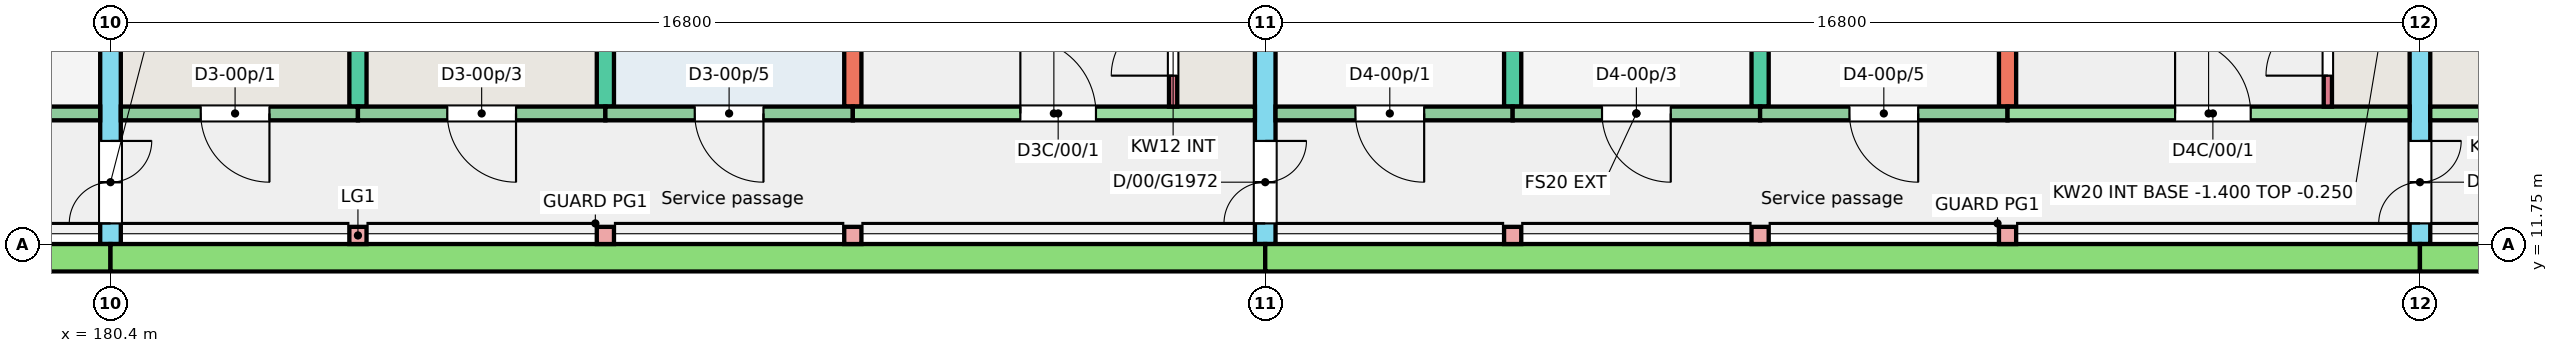
"""IFC4 building model, lengths in metres.
Left out: names, types, materials, properties, quantities, classifications, styles, units other than length and angle.
Written with IfcOpenShell. Run it as: python <this file> out.ifc"""

import sys

from ifc_helpers import new_model, si_unit, direction, frame, frame_2d, origin, origin_2d, place, context, subcontext, project, spatial, rectangle, extrude, element, fill, save


model = new_model("IFC4")
c1 = context("Model", 3, precision=1e-05, world=origin(), true_north=direction((0.0, 1.0)))
c2 = subcontext(c1, "Body", "Model", "MODEL_VIEW")
j1 = project(units=[si_unit("LENGTHUNIT", "METRE"), si_unit("PLANEANGLEUNIT", "RADIAN")], contexts=[c1])
p1 = place(None, origin())
s1 = spatial("IfcSite", under=j1, at=p1, CompositionType="ELEMENT")
p2 = place(p1, origin())
s2 = spatial("IfcBuilding", under=s1, at=p2, CompositionType="ELEMENT")
p3 = place(p2, origin())
s3 = spatial("IfcBuildingStorey", under=s2, at=p3, CompositionType="ELEMENT", Elevation=0.0)
p4 = place(p3, frame((180.4, 11.75, -0.25), z_axis=(0.0, 0.0, 1.0), x_axis=(0.0, 1.0, 0.0)))
e1 = element("IfcWall", 1, at=p4, inside=s3, PredefinedType="SHEAR", context=c2, shape_type="SweptSolid", body=[
    extrude(rectangle(XDim=11.0, YDim=0.3, at=frame_2d((5.5, 0.0))), origin(), (0.0, 0.0, 1.0), 3.25),
])
p5 = place(p4, frame((0.3, 0.0, 0.25)))
e2 = element("IfcOpeningElement", 2, at=p5, cuts=e1, PredefinedType="OPENING", context=c2, shape_type="SweptSolid", body=[
    extrude(rectangle(XDim=1.2, YDim=2.1, at=frame_2d((0.6, 1.05))), frame((0.0, 0.16, 0.0), z_axis=(0.0, -1.0, 0.0), x_axis=(1.0, 0.0, 0.0)), (0.0, 0.0, 1.0), 0.32),
])
for number, where, z_axis, x_axis in (
    (3, (184.0, 13.75, -0.25), (0.0, 0.0, 1.0), (0.0, 1.0, 0.0)),
    (4, (187.6, 13.75, -0.25), (0.0, 0.0, 1.0), (0.0, 1.0, 0.0)),
    (5, (191.2, 13.75, -0.25), (0.0, 0.0, 1.0), (0.0, 1.0, 0.0)),
):
    element("IfcWall", number, at=place(p3, frame(where, z_axis=z_axis, x_axis=x_axis)), inside=s3, PredefinedType="SHEAR", context=c2, shape_type="SweptSolid", body=[
        extrude(rectangle(XDim=9.0, YDim=0.25, at=frame_2d((4.5, 0.0))), origin(), (0.0, 0.0, 1.0), 3.25),
    ])
p6 = place(p3, frame((197.2, 11.75, -0.25), z_axis=(0.0, 0.0, 1.0), x_axis=(0.0, 1.0, 0.0)))
e6 = element("IfcWall", 6, at=p6, inside=s3, PredefinedType="SHEAR", context=c2, shape_type="SweptSolid", body=[
    extrude(rectangle(XDim=11.0, YDim=0.3, at=frame_2d((5.5, 0.0))), origin(), (0.0, 0.0, 1.0), 3.25),
])
p7 = place(p6, frame((0.3, 0.0, 0.25)))
e7 = element("IfcOpeningElement", 7, at=p7, cuts=e6, PredefinedType="OPENING", context=c2, shape_type="SweptSolid", body=[
    extrude(rectangle(XDim=1.2, YDim=2.1, at=frame_2d((0.6, 1.05))), frame((0.0, 0.16, 0.0), z_axis=(0.0, -1.0, 0.0), x_axis=(1.0, 0.0, 0.0)), (0.0, 0.0, 1.0), 0.32),
])
for number, where, z_axis, x_axis in (
    (8, (200.8, 13.75, -0.25), (0.0, 0.0, 1.0), (0.0, 1.0, 0.0)),
    (9, (204.4, 13.75, -0.25), (0.0, 0.0, 1.0), (0.0, 1.0, 0.0)),
    (10, (208.0, 13.75, -0.25), (0.0, 0.0, 1.0), (0.0, 1.0, 0.0)),
):
    element("IfcWall", number, at=place(p3, frame(where, z_axis=z_axis, x_axis=x_axis)), inside=s3, PredefinedType="SHEAR", context=c2, shape_type="SweptSolid", body=[
        extrude(rectangle(XDim=9.0, YDim=0.25, at=frame_2d((4.5, 0.0))), origin(), (0.0, 0.0, 1.0), 3.25),
    ])
p8 = place(p3, frame((214.0, 11.75, -0.25), z_axis=(0.0, 0.0, 1.0), x_axis=(0.0, 1.0, 0.0)))
e11 = element("IfcWall", 11, at=p8, inside=s3, PredefinedType="SHEAR", context=c2, shape_type="SweptSolid", body=[
    extrude(rectangle(XDim=11.0, YDim=0.3, at=frame_2d((5.5, 0.0))), origin(), (0.0, 0.0, 1.0), 3.25),
])
p9 = place(p8, frame((0.3, 0.0, 0.25)))
e12 = element("IfcOpeningElement", 12, at=p9, cuts=e11, PredefinedType="OPENING", context=c2, shape_type="SweptSolid", body=[
    extrude(rectangle(XDim=1.2, YDim=2.1, at=frame_2d((0.6, 1.05))), frame((0.0, 0.16, 0.0), z_axis=(0.0, -1.0, 0.0), x_axis=(1.0, 0.0, 0.0)), (0.0, 0.0, 1.0), 0.32),
])
p10 = place(p3, frame((176.8, 13.65, -0.25), z_axis=(0.0, 0.0, 1.0), x_axis=(1.0, 0.0, 0.0)))
e13 = element("IfcWall", 13, at=p10, inside=s3, PredefinedType="SOLIDWALL", context=c2, shape_type="SweptSolid", body=[
    extrude(rectangle(XDim=3.45, YDim=0.2, at=frame_2d((1.725, 0.0))), origin(), (0.0, 0.0, 1.0), 3.25),
])
p11 = place(p10, frame((1.288, 0.0, 0.25)))
e14 = element("IfcOpeningElement", 14, at=p11, cuts=e13, PredefinedType="OPENING", context=c2, shape_type="SweptSolid", body=[
    extrude(rectangle(XDim=1.0, YDim=2.1, at=frame_2d((0.5, 1.05))), frame((0.0, 0.11, 0.0), z_axis=(0.0, -1.0, 0.0), x_axis=(1.0, 0.0, 0.0)), (0.0, 0.0, 1.0), 0.22),
])
p12 = place(p3, frame((180.55, 13.65, -0.25), z_axis=(0.0, 0.0, 1.0), x_axis=(1.0, 0.0, 0.0)))
e15 = element("IfcWall", 15, at=p12, inside=s3, PredefinedType="SOLIDWALL", context=c2, shape_type="SweptSolid", body=[
    extrude(rectangle(XDim=3.45, YDim=0.2, at=frame_2d((1.725, 0.0))), origin(), (0.0, 0.0, 1.0), 3.25),
])
p13 = place(p12, frame((1.163, 0.0, 0.25)))
e16 = element("IfcOpeningElement", 16, at=p13, cuts=e15, PredefinedType="OPENING", context=c2, shape_type="SweptSolid", body=[
    extrude(rectangle(XDim=1.0, YDim=2.1, at=frame_2d((0.5, 1.05))), frame((0.0, 0.11, 0.0), z_axis=(0.0, -1.0, 0.0), x_axis=(1.0, 0.0, 0.0)), (0.0, 0.0, 1.0), 0.22),
])
p14 = place(p3, frame((184.0, 13.65, -0.25), z_axis=(0.0, 0.0, 1.0), x_axis=(1.0, 0.0, 0.0)))
e17 = element("IfcWall", 17, at=p14, inside=s3, PredefinedType="SOLIDWALL", context=c2, shape_type="SweptSolid", body=[
    extrude(rectangle(XDim=3.6, YDim=0.2, at=frame_2d((1.8, 0.0))), origin(), (0.0, 0.0, 1.0), 3.25),
])
p15 = place(p14, frame((1.3, 0.0, 0.25)))
e18 = element("IfcOpeningElement", 18, at=p15, cuts=e17, PredefinedType="OPENING", context=c2, shape_type="SweptSolid", body=[
    extrude(rectangle(XDim=1.0, YDim=2.1, at=frame_2d((0.5, 1.05))), frame((0.0, 0.11, 0.0), z_axis=(0.0, -1.0, 0.0), x_axis=(1.0, 0.0, 0.0)), (0.0, 0.0, 1.0), 0.22),
])
p16 = place(p3, frame((187.6, 13.65, -0.25), z_axis=(0.0, 0.0, 1.0), x_axis=(1.0, 0.0, 0.0)))
e19 = element("IfcWall", 19, at=p16, inside=s3, PredefinedType="SOLIDWALL", context=c2, shape_type="SweptSolid", body=[
    extrude(rectangle(XDim=3.6, YDim=0.2, at=frame_2d((1.8, 0.0))), origin(), (0.0, 0.0, 1.0), 3.25),
])
p17 = place(p16, frame((1.3, 0.0, 0.25)))
e20 = element("IfcOpeningElement", 20, at=p17, cuts=e19, PredefinedType="OPENING", context=c2, shape_type="SweptSolid", body=[
    extrude(rectangle(XDim=1.0, YDim=2.1, at=frame_2d((0.5, 1.05))), frame((0.0, 0.11, 0.0), z_axis=(0.0, -1.0, 0.0), x_axis=(1.0, 0.0, 0.0)), (0.0, 0.0, 1.0), 0.22),
])
p18 = place(p3, frame((191.2, 13.65, -0.25), z_axis=(0.0, 0.0, 1.0), x_axis=(1.0, 0.0, 0.0)))
e21 = element("IfcWall", 21, at=p18, inside=s3, PredefinedType="SHEAR", context=c2, shape_type="SweptSolid", body=[
    extrude(rectangle(XDim=5.85, YDim=0.2, at=frame_2d((2.925, 0.0))), origin(), (0.0, 0.0, 1.0), 3.25),
])
p19 = place(p18, frame((2.438, 0.0, 0.25)))
e22 = element("IfcOpeningElement", 22, at=p19, cuts=e21, PredefinedType="OPENING", context=c2, shape_type="SweptSolid", body=[
    extrude(rectangle(XDim=1.1, YDim=2.1, at=frame_2d((0.55, 1.05))), frame((0.0, 0.11, 0.0), z_axis=(0.0, -1.0, 0.0), x_axis=(1.0, 0.0, 0.0)), (0.0, 0.0, 1.0), 0.22),
])
p20 = place(p3, frame((195.86, 13.75, -0.25), z_axis=(0.0, 0.0, 1.0), x_axis=(0.0, 1.0, 0.0)))
e23 = element("IfcWall", 23, at=p20, inside=s3, PredefinedType="SHEAR", context=c2, shape_type="SweptSolid", body=[
    extrude(rectangle(XDim=1.72, YDim=0.12, at=frame_2d((0.86, 0.0))), origin(), (0.0, 0.0, 1.0), 3.25),
])
p21 = place(p20, frame((0.45, 0.0, 0.25)))
e24 = element("IfcOpeningElement", 24, at=p21, cuts=e23, PredefinedType="OPENING", context=c2, shape_type="SweptSolid", body=[
    extrude(rectangle(XDim=0.9, YDim=2.1, at=frame_2d((0.45, 1.05))), frame((0.0, 0.07, 0.0), z_axis=(0.0, -1.0, 0.0), x_axis=(1.0, 0.0, 0.0)), (0.0, 0.0, 1.0), 0.14),
])
p22 = place(p3, frame((197.35, 13.65, -0.25), z_axis=(0.0, 0.0, 1.0), x_axis=(1.0, 0.0, 0.0)))
e25 = element("IfcWall", 25, at=p22, inside=s3, PredefinedType="SOLIDWALL", context=c2, shape_type="SweptSolid", body=[
    extrude(rectangle(XDim=3.45, YDim=0.2, at=frame_2d((1.725, 0.0))), origin(), (0.0, 0.0, 1.0), 3.25),
])
p23 = place(p22, frame((1.163, 0.0, 0.25)))
e26 = element("IfcOpeningElement", 26, at=p23, cuts=e25, PredefinedType="OPENING", context=c2, shape_type="SweptSolid", body=[
    extrude(rectangle(XDim=1.0, YDim=2.1, at=frame_2d((0.5, 1.05))), frame((0.0, 0.11, 0.0), z_axis=(0.0, -1.0, 0.0), x_axis=(1.0, 0.0, 0.0)), (0.0, 0.0, 1.0), 0.22),
])
p24 = place(p3, frame((200.8, 13.65, -0.25), z_axis=(0.0, 0.0, 1.0), x_axis=(1.0, 0.0, 0.0)))
e27 = element("IfcWall", 27, at=p24, inside=s3, PredefinedType="SOLIDWALL", context=c2, shape_type="SweptSolid", body=[
    extrude(rectangle(XDim=3.6, YDim=0.2, at=frame_2d((1.8, 0.0))), origin(), (0.0, 0.0, 1.0), 3.25),
])
p25 = place(p24, frame((1.3, 0.0, 0.25)))
e28 = element("IfcOpeningElement", 28, at=p25, cuts=e27, PredefinedType="OPENING", context=c2, shape_type="SweptSolid", body=[
    extrude(rectangle(XDim=1.0, YDim=2.1, at=frame_2d((0.5, 1.05))), frame((0.0, 0.11, 0.0), z_axis=(0.0, -1.0, 0.0), x_axis=(1.0, 0.0, 0.0)), (0.0, 0.0, 1.0), 0.22),
])
p26 = place(p3, frame((204.4, 13.65, -0.25), z_axis=(0.0, 0.0, 1.0), x_axis=(1.0, 0.0, 0.0)))
e29 = element("IfcWall", 29, at=p26, inside=s3, PredefinedType="SOLIDWALL", context=c2, shape_type="SweptSolid", body=[
    extrude(rectangle(XDim=3.6, YDim=0.2, at=frame_2d((1.8, 0.0))), origin(), (0.0, 0.0, 1.0), 3.25),
])
p27 = place(p26, frame((1.3, 0.0, 0.25)))
e30 = element("IfcOpeningElement", 30, at=p27, cuts=e29, PredefinedType="OPENING", context=c2, shape_type="SweptSolid", body=[
    extrude(rectangle(XDim=1.0, YDim=2.1, at=frame_2d((0.5, 1.05))), frame((0.0, 0.11, 0.0), z_axis=(0.0, -1.0, 0.0), x_axis=(1.0, 0.0, 0.0)), (0.0, 0.0, 1.0), 0.22),
])
p28 = place(p3, frame((208.0, 13.65, -0.25), z_axis=(0.0, 0.0, 1.0), x_axis=(1.0, 0.0, 0.0)))
e31 = element("IfcWall", 31, at=p28, inside=s3, PredefinedType="SHEAR", context=c2, shape_type="SweptSolid", body=[
    extrude(rectangle(XDim=5.85, YDim=0.2, at=frame_2d((2.925, 0.0))), origin(), (0.0, 0.0, 1.0), 3.25),
])
p29 = place(p28, frame((2.438, 0.0, 0.25)))
e32 = element("IfcOpeningElement", 32, at=p29, cuts=e31, PredefinedType="OPENING", context=c2, shape_type="SweptSolid", body=[
    extrude(rectangle(XDim=1.1, YDim=2.1, at=frame_2d((0.55, 1.05))), frame((0.0, 0.11, 0.0), z_axis=(0.0, -1.0, 0.0), x_axis=(1.0, 0.0, 0.0)), (0.0, 0.0, 1.0), 0.22),
])
p30 = place(p3, frame((212.66, 13.75, -0.25), z_axis=(0.0, 0.0, 1.0), x_axis=(0.0, 1.0, 0.0)))
e33 = element("IfcWall", 33, at=p30, inside=s3, PredefinedType="SHEAR", context=c2, shape_type="SweptSolid", body=[
    extrude(rectangle(XDim=1.72, YDim=0.12, at=frame_2d((0.86, 0.0))), origin(), (0.0, 0.0, 1.0), 3.25),
])
p31 = place(p30, frame((0.45, 0.0, 0.25)))
e34 = element("IfcOpeningElement", 34, at=p31, cuts=e33, PredefinedType="OPENING", context=c2, shape_type="SweptSolid", body=[
    extrude(rectangle(XDim=0.9, YDim=2.1, at=frame_2d((0.45, 1.05))), frame((0.0, 0.07, 0.0), z_axis=(0.0, -1.0, 0.0), x_axis=(1.0, 0.0, 0.0)), (0.0, 0.0, 1.0), 0.14),
])
p32 = place(p3, frame((214.15, 13.65, -0.25), z_axis=(0.0, 0.0, 1.0), x_axis=(1.0, 0.0, 0.0)))
e35 = element("IfcWall", 35, at=p32, inside=s3, PredefinedType="SHEAR", context=c2, shape_type="SweptSolid", body=[
    extrude(rectangle(XDim=5.85, YDim=0.2, at=frame_2d((2.925, 0.0))), origin(), (0.0, 0.0, 1.0), 3.25),
])
p33 = place(p32, frame((2.312, 0.0, 0.25)))
e36 = element("IfcOpeningElement", 36, at=p33, cuts=e35, PredefinedType="OPENING", context=c2, shape_type="SweptSolid", body=[
    extrude(rectangle(XDim=1.1, YDim=2.1, at=frame_2d((0.55, 1.05))), frame((0.0, 0.11, 0.0), z_axis=(0.0, -1.0, 0.0), x_axis=(1.0, 0.0, 0.0)), (0.0, 0.0, 1.0), 0.22),
])
for number, where, z_axis, x_axis in (
    (37, (184.0, 11.875, -0.25), (0.0, 0.0, 1.0), (1.0, 0.0, 0.0)),
    (38, (187.6, 11.875, -0.25), (0.0, 0.0, 1.0), (1.0, 0.0, 0.0)),
    (39, (191.2, 11.875, -0.25), (0.0, 0.0, 1.0), (1.0, 0.0, 0.0)),
    (40, (200.8, 11.875, -0.25), (0.0, 0.0, 1.0), (1.0, 0.0, 0.0)),
    (41, (204.4, 11.875, -0.25), (0.0, 0.0, 1.0), (1.0, 0.0, 0.0)),
    (42, (208.0, 11.875, -0.25), (0.0, 0.0, 1.0), (1.0, 0.0, 0.0)),
):
    element("IfcColumn", number, at=place(p3, frame(where, z_axis=z_axis, x_axis=x_axis)), inside=s3, PredefinedType="COLUMN", context=c2, shape_type="SweptSolid", body=[
        extrude(rectangle(XDim=0.25, YDim=0.25, at=origin_2d()), origin(), (0.0, 0.0, 1.0), 3.25),
    ])
p34 = place(p3, frame((163.6, 11.55, -0.25), z_axis=(0.0, 0.0, 1.0), x_axis=(1.0, 0.0, 0.0)))
e43 = element("IfcWall", 43, at=p34, inside=s3, PredefinedType="SOLIDWALL", context=c2, shape_type="SweptSolid", body=[
    extrude(rectangle(XDim=16.8, YDim=0.4, at=frame_2d((8.4, 0.0))), origin(), (0.0, 0.0, 1.0), 3.25),
])
for number, where, z_axis, x_axis in (
    (44, (180.4, 11.55, -0.25), (0.0, 0.0, 1.0), (1.0, 0.0, 0.0)),
    (45, (197.2, 11.55, -0.25), (0.0, 0.0, 1.0), (1.0, 0.0, 0.0)),
    (46, (214.0, 11.55, -0.25), (0.0, 0.0, 1.0), (1.0, 0.0, 0.0)),
):
    element("IfcWall", number, at=place(p3, frame(where, z_axis=z_axis, x_axis=x_axis)), inside=s3, PredefinedType="SOLIDWALL", context=c2, shape_type="SweptSolid", body=[
        extrude(rectangle(XDim=16.8, YDim=0.4, at=frame_2d((8.4, 0.0))), origin(), (0.0, 0.0, 1.0), 3.25),
    ])
p35 = place(p13, origin())
e47 = element("IfcDoor", 47, at=p35, inside=s3, OperationType="SINGLE_SWING_RIGHT", PredefinedType="DOOR", context=c2, shape_type="SweptSolid", body=[
    extrude(rectangle(XDim=1.0, YDim=2.1, at=frame_2d((0.5, 1.05))), frame((0.0, 0.025, 0.0), z_axis=(0.0, -1.0, 0.0), x_axis=(1.0, 0.0, 0.0)), (0.0, 0.0, 1.0), 0.05),
])
fill(e16, e47)
p36 = place(p15, origin())
e48 = element("IfcDoor", 48, at=p36, inside=s3, OperationType="SINGLE_SWING_RIGHT", PredefinedType="DOOR", context=c2, shape_type="SweptSolid", body=[
    extrude(rectangle(XDim=1.0, YDim=2.1, at=frame_2d((0.5, 1.05))), frame((0.0, 0.025, 0.0), z_axis=(0.0, -1.0, 0.0), x_axis=(1.0, 0.0, 0.0)), (0.0, 0.0, 1.0), 0.05),
])
fill(e18, e48)
p37 = place(p17, origin())
e49 = element("IfcDoor", 49, at=p37, inside=s3, OperationType="SINGLE_SWING_RIGHT", PredefinedType="DOOR", context=c2, shape_type="SweptSolid", body=[
    extrude(rectangle(XDim=1.0, YDim=2.1, at=frame_2d((0.5, 1.05))), frame((0.0, 0.025, 0.0), z_axis=(0.0, -1.0, 0.0), x_axis=(1.0, 0.0, 0.0)), (0.0, 0.0, 1.0), 0.05),
])
fill(e20, e49)
p38 = place(p23, origin())
e50 = element("IfcDoor", 50, at=p38, inside=s3, OperationType="SINGLE_SWING_RIGHT", PredefinedType="DOOR", context=c2, shape_type="SweptSolid", body=[
    extrude(rectangle(XDim=1.0, YDim=2.1, at=frame_2d((0.5, 1.05))), frame((0.0, 0.025, 0.0), z_axis=(0.0, -1.0, 0.0), x_axis=(1.0, 0.0, 0.0)), (0.0, 0.0, 1.0), 0.05),
])
fill(e26, e50)
p39 = place(p25, origin())
e51 = element("IfcDoor", 51, at=p39, inside=s3, OperationType="SINGLE_SWING_RIGHT", PredefinedType="DOOR", context=c2, shape_type="SweptSolid", body=[
    extrude(rectangle(XDim=1.0, YDim=2.1, at=frame_2d((0.5, 1.05))), frame((0.0, 0.025, 0.0), z_axis=(0.0, -1.0, 0.0), x_axis=(1.0, 0.0, 0.0)), (0.0, 0.0, 1.0), 0.05),
])
fill(e28, e51)
p40 = place(p27, origin())
e52 = element("IfcDoor", 52, at=p40, inside=s3, OperationType="SINGLE_SWING_RIGHT", PredefinedType="DOOR", context=c2, shape_type="SweptSolid", body=[
    extrude(rectangle(XDim=1.0, YDim=2.1, at=frame_2d((0.5, 1.05))), frame((0.0, 0.025, 0.0), z_axis=(0.0, -1.0, 0.0), x_axis=(1.0, 0.0, 0.0)), (0.0, 0.0, 1.0), 0.05),
])
fill(e30, e52)
p41 = place(p19, origin())
e53 = element("IfcDoor", 53, at=p41, inside=s3, OperationType="SINGLE_SWING_LEFT", PredefinedType="DOOR", context=c2, shape_type="SweptSolid", body=[
    extrude(rectangle(XDim=1.1, YDim=2.1, at=frame_2d((0.55, 1.05))), frame((0.0, 0.025, 0.0), z_axis=(0.0, -1.0, 0.0), x_axis=(1.0, 0.0, 0.0)), (0.0, 0.0, 1.0), 0.05),
])
fill(e22, e53)
p42 = place(p21, origin())
e54 = element("IfcDoor", 54, at=p42, inside=s3, OperationType="SINGLE_SWING_LEFT", PredefinedType="DOOR", context=c2, shape_type="SweptSolid", body=[
    extrude(rectangle(XDim=0.9, YDim=2.1, at=frame_2d((0.45, 1.05))), frame((0.0, 0.025, 0.0), z_axis=(0.0, -1.0, 0.0), x_axis=(1.0, 0.0, 0.0)), (0.0, 0.0, 1.0), 0.05),
])
fill(e24, e54)
p43 = place(p29, origin())
e55 = element("IfcDoor", 55, at=p43, inside=s3, OperationType="SINGLE_SWING_LEFT", PredefinedType="DOOR", context=c2, shape_type="SweptSolid", body=[
    extrude(rectangle(XDim=1.1, YDim=2.1, at=frame_2d((0.55, 1.05))), frame((0.0, 0.025, 0.0), z_axis=(0.0, -1.0, 0.0), x_axis=(1.0, 0.0, 0.0)), (0.0, 0.0, 1.0), 0.05),
])
fill(e32, e55)
p44 = place(p31, origin())
e56 = element("IfcDoor", 56, at=p44, inside=s3, OperationType="SINGLE_SWING_LEFT", PredefinedType="DOOR", context=c2, shape_type="SweptSolid", body=[
    extrude(rectangle(XDim=0.9, YDim=2.1, at=frame_2d((0.45, 1.05))), frame((0.0, 0.025, 0.0), z_axis=(0.0, -1.0, 0.0), x_axis=(1.0, 0.0, 0.0)), (0.0, 0.0, 1.0), 0.05),
])
fill(e34, e56)
p45 = place(p5, origin())
e57 = element("IfcDoor", 57, at=p45, inside=s3, OperationType="DOUBLE_DOOR_SINGLE_SWING", PredefinedType="DOOR", context=c2, shape_type="SweptSolid", body=[
    extrude(rectangle(XDim=1.2, YDim=2.1, at=frame_2d((0.6, 1.05))), frame((0.0, 0.025, 0.0), z_axis=(0.0, -1.0, 0.0), x_axis=(1.0, 0.0, 0.0)), (0.0, 0.0, 1.0), 0.05),
])
fill(e2, e57)
p46 = place(p7, origin())
e58 = element("IfcDoor", 58, at=p46, inside=s3, OperationType="DOUBLE_DOOR_SINGLE_SWING", PredefinedType="DOOR", context=c2, shape_type="SweptSolid", body=[
    extrude(rectangle(XDim=1.2, YDim=2.1, at=frame_2d((0.6, 1.05))), frame((0.0, 0.025, 0.0), z_axis=(0.0, -1.0, 0.0), x_axis=(1.0, 0.0, 0.0)), (0.0, 0.0, 1.0), 0.05),
])
fill(e7, e58)
p47 = place(p9, origin())
e59 = element("IfcDoor", 59, at=p47, inside=s3, OperationType="DOUBLE_DOOR_SINGLE_SWING", PredefinedType="DOOR", context=c2, shape_type="SweptSolid", body=[
    extrude(rectangle(XDim=1.2, YDim=2.1, at=frame_2d((0.6, 1.05))), frame((0.0, 0.025, 0.0), z_axis=(0.0, -1.0, 0.0), x_axis=(1.0, 0.0, 0.0)), (0.0, 0.0, 1.0), 0.05),
])
fill(e12, e59)
save(model, sys.argv[1])
